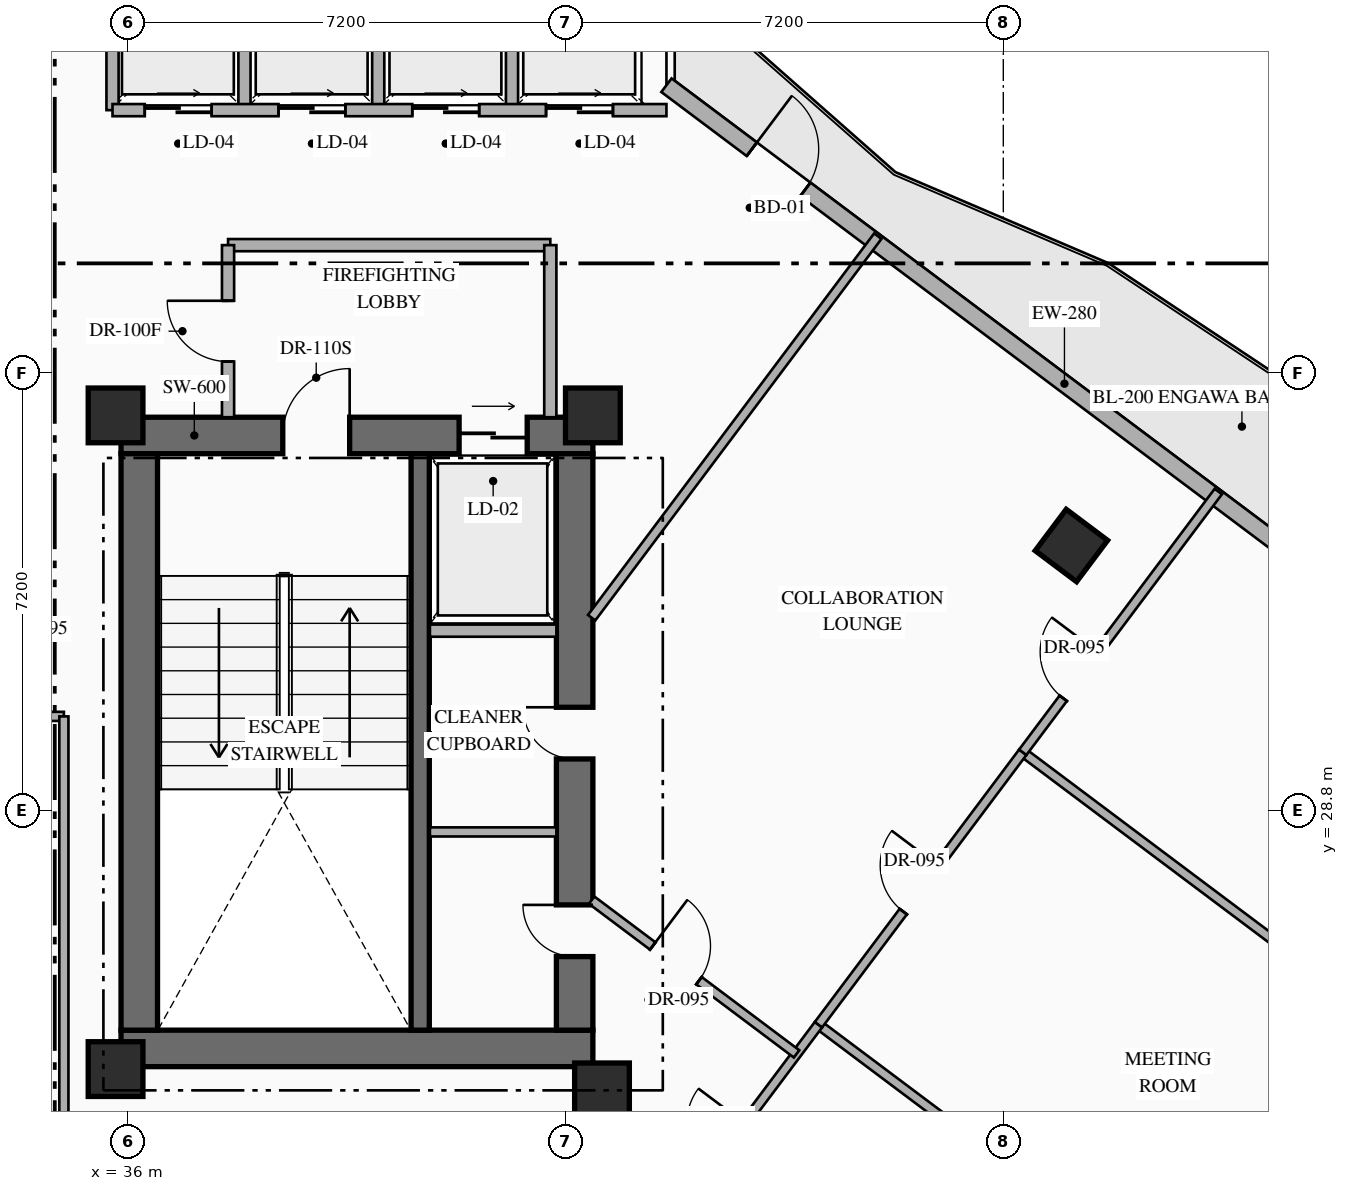
"""IFC4 building model, lengths in metres.
Left out: names, types, materials, properties, quantities, classifications, styles, units other than length and angle.
Written with IfcOpenShell. Run it as: python <this file> out.ifc"""

import sys

from ifc_helpers import new_model, si_unit, direction, frame, frame_2d, origin, origin_2d, place, context, subcontext, project, spatial, rectangle, hollow_rectangle, extrude, element, fill, save


model = new_model("IFC4")
c1 = context("Model", 3, precision=1e-05, world=origin(), true_north=direction((0.0, 1.0)))
c2 = subcontext(c1, "Body", "Model", "MODEL_VIEW")
j1 = project(units=[si_unit("LENGTHUNIT", "METRE"), si_unit("PLANEANGLEUNIT", "RADIAN")], contexts=[c1])
p1 = place(None, origin())
s1 = spatial("IfcSite", under=j1, at=p1, CompositionType="ELEMENT")
p2 = place(p1, origin())
s2 = spatial("IfcBuilding", under=s1, at=p2, CompositionType="ELEMENT")
p3 = place(p2, frame((0.0, 0.0, 145.65)))
s3 = spatial("IfcBuildingStorey", under=s2, at=p3, CompositionType="ELEMENT", Elevation=145.65)
p4 = place(p3, frame((35.89, 24.89, 0.0), z_axis=(0.0, 0.0, 1.0), x_axis=(1.0, 0.0, 0.0)))
e1 = element("IfcWall", 1, at=p4, inside=s3, PredefinedType="SHEAR", context=c2, shape_type="SweptSolid", body=[
    extrude(rectangle(XDim=7.76, YDim=0.6, at=frame_2d((3.88, 0.0))), origin(), (0.0, 0.0, 1.0), 3.6),
])
p5 = place(p3, frame((35.89, 34.97, 0.0), z_axis=(0.0, 0.0, 1.0), x_axis=(1.0, 0.0, 0.0)))
e2 = element("IfcWall", 2, at=p5, inside=s3, PredefinedType="SHEAR", context=c2, shape_type="SweptSolid", body=[
    extrude(rectangle(XDim=7.76, YDim=0.6, at=frame_2d((3.88, 0.0))), origin(), (0.0, 0.0, 1.0), 3.6),
])
p6 = place(p5, frame((2.66, 0.0, 0.0)))
e3 = element("IfcOpeningElement", 3, at=p6, cuts=e2, PredefinedType="OPENING", context=c2, shape_type="SweptSolid", body=[
    extrude(rectangle(XDim=1.1, YDim=2.2, at=frame_2d((0.55, 1.1))), frame((0.0, 0.31, 0.0), z_axis=(0.0, -1.0, 0.0), x_axis=(1.0, 0.0, 0.0)), (0.0, 0.0, 1.0), 0.62),
])
p7 = place(p5, frame((5.56, 0.0, 0.0)))
e4 = element("IfcOpeningElement", 4, at=p7, cuts=e2, PredefinedType="OPENING", context=c2, shape_type="SweptSolid", body=[
    extrude(rectangle(XDim=1.12, YDim=2.15, at=frame_2d((0.56, 1.075))), frame((0.0, 0.31, 0.0), z_axis=(0.0, -1.0, 0.0), x_axis=(1.0, 0.0, 0.0)), (0.0, 0.0, 1.0), 0.62),
])
p8 = place(p3, frame((36.19, 25.19, 0.0), z_axis=(0.0, 0.0, 1.0), x_axis=(0.0, 1.0, 0.0)))
e5 = element("IfcWall", 5, at=p8, inside=s3, PredefinedType="SHEAR", context=c2, shape_type="SweptSolid", body=[
    extrude(rectangle(XDim=9.48, YDim=0.6, at=frame_2d((4.74, 0.0))), origin(), (0.0, 0.0, 1.0), 3.6),
])
p9 = place(p3, frame((43.35, 25.19, 0.0), z_axis=(0.0, 0.0, 1.0), x_axis=(0.0, 1.0, 0.0)))
e6 = element("IfcWall", 6, at=p9, inside=s3, PredefinedType="SHEAR", context=c2, shape_type="SweptSolid", body=[
    extrude(rectangle(XDim=9.48, YDim=0.6, at=frame_2d((4.74, 0.0))), origin(), (0.0, 0.0, 1.0), 3.6),
])
p10 = place(p9, frame((1.21, 0.0, 0.0)))
e7 = element("IfcOpeningElement", 7, at=p10, cuts=e6, PredefinedType="OPENING", context=c2, shape_type="SweptSolid", body=[
    extrude(rectangle(XDim=0.85, YDim=2.08, at=frame_2d((0.425, 1.04))), frame((0.0, 0.31, 0.0), z_axis=(0.0, -1.0, 0.0), x_axis=(1.0, 0.0, 0.0)), (0.0, 0.0, 1.0), 0.62),
])
p11 = place(p9, frame((4.46, 0.0, 0.0)))
e8 = element("IfcOpeningElement", 8, at=p11, cuts=e6, PredefinedType="OPENING", context=c2, shape_type="SweptSolid", body=[
    extrude(rectangle(XDim=0.85, YDim=2.08, at=frame_2d((0.425, 1.04))), frame((0.0, 0.31, 0.0), z_axis=(0.0, -1.0, 0.0), x_axis=(1.0, 0.0, 0.0)), (0.0, 0.0, 1.0), 0.62),
])
p12 = place(p3, frame((40.81, 25.19, 0.0), z_axis=(0.0, 0.0, 1.0), x_axis=(0.0, 1.0, 0.0)))
e9 = element("IfcWall", 9, at=p12, inside=s3, PredefinedType="SHEAR", context=c2, shape_type="SweptSolid", body=[
    extrude(rectangle(XDim=9.48, YDim=0.3, at=frame_2d((4.74, 0.0))), origin(), (0.0, 0.0, 1.0), 3.6),
])
for number, where, z_axis, x_axis in (
    (10, (35.8, 24.55, 0.0), (0.0, 0.0, 1.0), (1.0, 0.0, 0.0)),
    (11, (43.8, 24.2, 0.0), (0.0, 0.0, 1.0), (1.0, 0.0, 0.0)),
    (12, (35.8, 35.3, 0.0), (0.0, 0.0, 1.0), (1.0, 0.0, 0.0)),
    (13, (43.65, 35.3, 0.0), (0.0, 0.0, 1.0), (1.0, 0.0, 0.0)),
):
    element("IfcColumn", number, at=place(p3, frame(where, z_axis=z_axis, x_axis=x_axis)), inside=s3, PredefinedType="COLUMN", context=c2, shape_type="SweptSolid", body=[
        extrude(rectangle(XDim=0.9, YDim=0.9, at=origin_2d()), origin(), (0.0, 0.0, 1.0), 3.6),
    ])
p13 = place(p3, frame((51.52, 33.16, 0.0), z_axis=(0.0, 0.0, 1.0), x_axis=(0.799999996291, -0.600000004945, 0.0)))
e14 = element("IfcColumn", 14, at=p13, inside=s3, PredefinedType="COLUMN", context=c2, shape_type="SweptSolid", body=[
    extrude(hollow_rectangle(XDim=0.85, YDim=0.85, WallThickness=0.032, at=origin_2d()), origin(), (0.0, 0.0, 1.0), 3.6),
])
p14 = place(p3, frame((44.86, 40.73, 0.0), z_axis=(0.0, 0.0, 1.0), x_axis=(0.800007624502, -0.599989833863, 0.0)))
e15 = element("IfcWall", 15, at=p14, inside=s3, PredefinedType="STANDARD", context=c2, shape_type="SweptSolid", body=[
    extrude(rectangle(XDim=19.212, YDim=0.28, at=frame_2d((9.606, 0.0))), origin(), (0.0, 0.0, 1.0), 3.35),
])
p15 = place(p14, frame((1.755, 0.0, 0.0)))
e16 = element("IfcOpeningElement", 16, at=p15, cuts=e15, PredefinedType="OPENING", context=c2, shape_type="SweptSolid", body=[
    extrude(rectangle(XDim=1.1, YDim=2.2, at=frame_2d((0.55, 1.1))), frame((0.0, 0.15, 0.0), z_axis=(0.0, -1.0, 0.0), x_axis=(1.0, 0.0, 0.0)), (0.0, 0.0, 1.0), 0.3),
])
p16 = place(p14, frame((13.509, 0.0, 0.85)))
e17 = element("IfcOpeningElement", 17, at=p16, cuts=e15, PredefinedType="OPENING", context=c2, shape_type="SweptSolid", body=[
    extrude(rectangle(XDim=1.8, YDim=2.1, at=frame_2d((0.9, 1.05))), frame((0.0, 0.15, 0.0), z_axis=(0.0, -1.0, 0.0), x_axis=(1.0, 0.0, 0.0)), (0.0, 0.0, 1.0), 0.3),
])
p17 = place(p3, frame((40.97, 31.76, 0.0), z_axis=(0.0, 0.0, 1.0), x_axis=(1.0, 0.0, 0.0)))
e18 = element("IfcWall", 18, at=p17, inside=s3, PredefinedType="STANDARD", context=c2, shape_type="SweptSolid", body=[
    extrude(rectangle(XDim=2.08, YDim=0.2, at=frame_2d((1.04, 0.0))), origin(), (0.0, 0.0, 1.0), 3.35),
])
p18 = place(p3, frame((40.97, 28.45, 0.0), z_axis=(0.0, 0.0, 1.0), x_axis=(1.0, 0.0, 0.0)))
e19 = element("IfcWall", 19, at=p18, inside=s3, PredefinedType="PARTITIONING", context=c2, shape_type="SweptSolid", body=[
    extrude(rectangle(XDim=2.08, YDim=0.15, at=frame_2d((1.04, 0.0))), origin(), (0.0, 0.0, 1.0), 3.35),
])
p19 = place(p3, frame((37.65, 38.1, 0.0), z_axis=(0.0, 0.0, 1.0), x_axis=(1.0, 0.0, 0.0)))
e20 = element("IfcWall", 20, at=p19, inside=s3, PredefinedType="STANDARD", context=c2, shape_type="SweptSolid", body=[
    extrude(rectangle(XDim=5.3, YDim=0.2, at=frame_2d((2.65, 0.0))), origin(), (0.0, 0.0, 1.0), 3.35),
])
p20 = place(p3, frame((42.95, 35.27, 0.0), z_axis=(0.0, 0.0, 1.0), x_axis=(0.0, 1.0, 0.0)))
e21 = element("IfcWall", 21, at=p20, inside=s3, PredefinedType="STANDARD", context=c2, shape_type="SweptSolid", body=[
    extrude(rectangle(XDim=2.83, YDim=0.2, at=frame_2d((1.415, 0.0))), origin(), (0.0, 0.0, 1.0), 3.35),
])
p21 = place(p3, frame((37.65, 35.27, 0.0), z_axis=(0.0, 0.0, 1.0), x_axis=(0.0, 1.0, 0.0)))
e22 = element("IfcWall", 22, at=p21, inside=s3, PredefinedType="STANDARD", context=c2, shape_type="SweptSolid", body=[
    extrude(rectangle(XDim=2.83, YDim=0.2, at=frame_2d((1.415, 0.0))), origin(), (0.0, 0.0, 1.0), 3.35),
])
p22 = place(p21, frame((0.915, 0.0, 0.0)))
e23 = element("IfcOpeningElement", 23, at=p22, cuts=e22, PredefinedType="OPENING", context=c2, shape_type="SweptSolid", body=[
    extrude(rectangle(XDim=1.0, YDim=2.2, at=frame_2d((0.5, 1.1))), frame((0.0, 0.11, 0.0), z_axis=(0.0, -1.0, 0.0), x_axis=(1.0, 0.0, 0.0)), (0.0, 0.0, 1.0), 0.22),
])
for number, where, z_axis, x_axis in (
    (24, (35.75, 40.32, 0.0), (0.0, 0.0, 1.0), (0.0, 1.0, 0.0)),
    (25, (37.92, 40.32, 0.0), (0.0, 0.0, 1.0), (0.0, 1.0, 0.0)),
    (26, (40.12, 40.32, 0.0), (0.0, 0.0, 1.0), (0.0, 1.0, 0.0)),
    (27, (42.32, 40.32, 0.0), (0.0, 0.0, 1.0), (0.0, 1.0, 0.0)),
):
    element("IfcWall", number, at=place(p3, frame(where, z_axis=z_axis, x_axis=x_axis)), inside=s3, PredefinedType="STANDARD", context=c2, shape_type="SweptSolid", body=[
        extrude(rectangle(XDim=2.16, YDim=0.2, at=frame_2d((1.08, 0.0))), origin(), (0.0, 0.0, 1.0), 3.35),
    ])
p23 = place(p3, frame((35.75, 40.32, 0.0), z_axis=(0.0, 0.0, 1.0), x_axis=(1.0, 0.0, 0.0)))
e28 = element("IfcWall", 28, at=p23, inside=s3, PredefinedType="STANDARD", context=c2, shape_type="SweptSolid", body=[
    extrude(rectangle(XDim=9.11, YDim=0.2, at=frame_2d((4.555, 0.0))), origin(), (0.0, 0.0, 1.0), 3.35),
])
p24 = place(p23, frame((0.53, 0.0, 0.0)))
e29 = element("IfcOpeningElement", 29, at=p24, cuts=e28, PredefinedType="OPENING", context=c2, shape_type="SweptSolid", body=[
    extrude(rectangle(XDim=1.1, YDim=2.18, at=frame_2d((0.55, 1.09))), frame((0.0, 0.11, 0.0), z_axis=(0.0, -1.0, 0.0), x_axis=(1.0, 0.0, 0.0)), (0.0, 0.0, 1.0), 0.22),
])
p25 = place(p23, frame((2.73, 0.0, 0.0)))
e30 = element("IfcOpeningElement", 30, at=p25, cuts=e28, PredefinedType="OPENING", context=c2, shape_type="SweptSolid", body=[
    extrude(rectangle(XDim=1.1, YDim=2.18, at=frame_2d((0.55, 1.09))), frame((0.0, 0.11, 0.0), z_axis=(0.0, -1.0, 0.0), x_axis=(1.0, 0.0, 0.0)), (0.0, 0.0, 1.0), 0.22),
])
p26 = place(p23, frame((4.93, 0.0, 0.0)))
e31 = element("IfcOpeningElement", 31, at=p26, cuts=e28, PredefinedType="OPENING", context=c2, shape_type="SweptSolid", body=[
    extrude(rectangle(XDim=1.1, YDim=2.18, at=frame_2d((0.55, 1.09))), frame((0.0, 0.11, 0.0), z_axis=(0.0, -1.0, 0.0), x_axis=(1.0, 0.0, 0.0)), (0.0, 0.0, 1.0), 0.22),
])
p27 = place(p23, frame((7.13, 0.0, 0.0)))
e32 = element("IfcOpeningElement", 32, at=p27, cuts=e28, PredefinedType="OPENING", context=c2, shape_type="SweptSolid", body=[
    extrude(rectangle(XDim=1.1, YDim=2.18, at=frame_2d((0.55, 1.09))), frame((0.0, 0.11, 0.0), z_axis=(0.0, -1.0, 0.0), x_axis=(1.0, 0.0, 0.0)), (0.0, 0.0, 1.0), 0.22),
])
p28 = place(p3, frame((30.5, 30.35, 0.0), z_axis=(0.0, 0.0, 1.0), x_axis=(1.0, 0.0, 0.0)))
e33 = element("IfcWall", 33, at=p28, inside=s3, PredefinedType="PARTITIONING", context=c2, shape_type="SweptSolid", body=[
    extrude(rectangle(XDim=4.45, YDim=0.15, at=frame_2d((2.225, 0.0))), origin(), (0.0, 0.0, 1.0), 3.35),
])
p29 = place(p28, frame((2.846, 0.0, 0.0)))
e34 = element("IfcOpeningElement", 34, at=p29, cuts=e33, PredefinedType="OPENING", context=c2, shape_type="SweptSolid", body=[
    extrude(rectangle(XDim=0.95, YDim=2.15, at=frame_2d((0.475, 1.075))), frame((0.0, 0.085, 0.0), z_axis=(0.0, -1.0, 0.0), x_axis=(1.0, 0.0, 0.0)), (0.0, 0.0, 1.0), 0.17),
])
p30 = place(p3, frame((34.95, 23.2, 0.0), z_axis=(0.0, 0.0, 1.0), x_axis=(0.0, 1.0, 0.0)))
e35 = element("IfcWall", 35, at=p30, inside=s3, PredefinedType="PARTITIONING", context=c2, shape_type="SweptSolid", body=[
    extrude(rectangle(XDim=7.15, YDim=0.15, at=frame_2d((3.575, 0.0))), origin(), (0.0, 0.0, 1.0), 3.35),
])
p31 = place(p3, frame((47.36, 25.28, 0.0), z_axis=(0.0, 0.0, 1.0), x_axis=(0.799991516197, -0.600011311571, 0.0)))
e36 = element("IfcWall", 36, at=p31, inside=s3, PredefinedType="PARTITIONING", context=c2, shape_type="SweptSolid", body=[
    extrude(rectangle(XDim=10.36, YDim=0.15, at=frame_2d((5.18, 0.0))), origin(), (0.0, 0.0, 1.0), 3.35),
])
p32 = place(p3, frame((44.36, 21.28, 0.0), z_axis=(0.0, 0.0, 1.0), x_axis=(0.6, 0.8, 0.0)))
e37 = element("IfcWall", 37, at=p32, inside=s3, PredefinedType="PARTITIONING", context=c2, shape_type="SweptSolid", body=[
    extrude(rectangle(XDim=5.0, YDim=0.15, at=frame_2d((2.5, 0.0))), origin(), (0.0, 0.0, 1.0), 3.35),
])
p33 = place(p32, frame((2.025, 0.0, 0.0)))
e38 = element("IfcOpeningElement", 38, at=p33, cuts=e37, PredefinedType="OPENING", context=c2, shape_type="SweptSolid", body=[
    extrude(rectangle(XDim=0.95, YDim=2.15, at=frame_2d((0.475, 1.075))), frame((0.0, 0.085, 0.0), z_axis=(0.0, -1.0, 0.0), x_axis=(1.0, 0.0, 0.0)), (0.0, 0.0, 1.0), 0.17),
])
p34 = place(p3, frame((50.72, 29.76, 0.0), z_axis=(0.0, 0.0, 1.0), x_axis=(0.8, -0.6, 0.0)))
e39 = element("IfcWall", 39, at=p34, inside=s3, PredefinedType="PARTITIONING", context=c2, shape_type="SweptSolid", body=[
    extrude(rectangle(XDim=10.36, YDim=0.15, at=frame_2d((5.18, 0.0))), origin(), (0.0, 0.0, 1.0), 3.35),
])
p35 = place(p3, frame((47.36, 25.28, 0.0), z_axis=(0.0, 0.0, 1.0), x_axis=(0.599986048773, 0.80001046323, 0.0)))
e40 = element("IfcWall", 40, at=p35, inside=s3, PredefinedType="PARTITIONING", context=c2, shape_type="SweptSolid", body=[
    extrude(rectangle(XDim=5.6, YDim=0.15, at=frame_2d((2.8, 0.0))), origin(), (0.0, 0.0, 1.0), 3.35),
])
p36 = place(p35, frame((2.325, 0.0, 0.0)))
e41 = element("IfcOpeningElement", 41, at=p36, cuts=e40, PredefinedType="OPENING", context=c2, shape_type="SweptSolid", body=[
    extrude(rectangle(XDim=0.95, YDim=2.15, at=frame_2d((0.475, 1.075))), frame((0.0, 0.085, 0.0), z_axis=(0.0, -1.0, 0.0), x_axis=(1.0, 0.0, 0.0)), (0.0, 0.0, 1.0), 0.17),
])
p37 = place(p3, frame((50.72, 29.76, 0.0), z_axis=(0.0, 0.0, 1.0), x_axis=(0.6, 0.8, 0.0)))
e42 = element("IfcWall", 42, at=p37, inside=s3, PredefinedType="PARTITIONING", context=c2, shape_type="SweptSolid", body=[
    extrude(rectangle(XDim=5.36, YDim=0.15, at=frame_2d((2.68, 0.0))), origin(), (0.0, 0.0, 1.0), 3.35),
])
p38 = place(p37, frame((1.11, 0.0, 0.0)))
e43 = element("IfcOpeningElement", 43, at=p38, cuts=e42, PredefinedType="OPENING", context=c2, shape_type="SweptSolid", body=[
    extrude(rectangle(XDim=0.95, YDim=2.15, at=frame_2d((0.475, 1.075))), frame((0.0, 0.085, 0.0), z_axis=(0.0, -1.0, 0.0), x_axis=(1.0, 0.0, 0.0)), (0.0, 0.0, 1.0), 0.17),
])
p39 = place(p3, frame((43.63, 27.328, 0.0), z_axis=(0.0, 0.0, 1.0), x_axis=(0.799972182084, -0.600037088764, 0.0)))
e44 = element("IfcWall", 44, at=p39, inside=s3, PredefinedType="PARTITIONING", context=c2, shape_type="SweptSolid", body=[
    extrude(rectangle(XDim=4.213, YDim=0.15, at=frame_2d((2.106, 0.0))), origin(), (0.0, 0.0, 1.0), 3.045),
])
p40 = place(p39, frame((1.256, 0.0, 0.0)))
e45 = element("IfcOpeningElement", 45, at=p40, cuts=e44, PredefinedType="OPENING", context=c2, shape_type="SweptSolid", body=[
    extrude(rectangle(XDim=0.95, YDim=2.15, at=frame_2d((0.475, 1.075))), frame((0.0, 0.085, 0.0), z_axis=(0.0, -1.0, 0.0), x_axis=(1.0, 0.0, 0.0)), (0.0, 0.0, 1.0), 0.17),
])
p41 = place(p3, frame((43.63, 31.973, 0.0), z_axis=(0.0, 0.0, 1.0), x_axis=(0.599975099311, 0.800018674911, 0.0)))
e46 = element("IfcWall", 46, at=p41, inside=s3, PredefinedType="PARTITIONING", context=c2, shape_type="SweptSolid", body=[
    extrude(rectangle(XDim=7.844, YDim=0.15, at=frame_2d((3.922, 0.0))), origin(), (0.0, 0.0, 1.0), 3.35),
])
p42 = place(p3, frame((27.91, 26.68, 0.0), z_axis=(0.0, 0.0, 1.0), x_axis=(0.800005938517, -0.599992081896, 0.0)))
e47 = element("IfcWall", 47, at=p42, inside=s3, PredefinedType="PARTITIONING", context=c2, shape_type="SweptSolid", body=[
    extrude(rectangle(XDim=14.8, YDim=0.15, at=frame_2d((7.4, 0.0))), origin(), (0.0, 0.0, 1.0), 3.35),
])
p43 = place(p42, frame((9.281, 0.0, 0.0)))
e48 = element("IfcOpeningElement", 48, at=p43, cuts=e47, PredefinedType="OPENING", context=c2, shape_type="SweptSolid", body=[
    extrude(rectangle(XDim=0.95, YDim=2.15, at=frame_2d((0.475, 1.075))), frame((0.0, 0.085, 0.0), z_axis=(0.0, -1.0, 0.0), x_axis=(1.0, 0.0, 0.0)), (0.0, 0.0, 1.0), 0.17),
])
p44 = place(p15, origin())
e49 = element("IfcDoor", 49, at=p44, inside=s3, OperationType="SINGLE_SWING_LEFT", PredefinedType="DOOR", context=c2, shape_type="SweptSolid", body=[
    extrude(rectangle(XDim=1.1, YDim=2.2, at=frame_2d((0.55, 1.1))), frame((0.0, 0.025, 0.0), z_axis=(0.0, -1.0, 0.0), x_axis=(1.0, 0.0, 0.0)), (0.0, 0.0, 1.0), 0.05),
])
fill(e16, e49)
p45 = place(p6, origin())
e50 = element("IfcDoor", 50, at=p45, inside=s3, OperationType="SINGLE_SWING_RIGHT", PredefinedType="DOOR", context=c2, shape_type="SweptSolid", body=[
    extrude(rectangle(XDim=1.1, YDim=2.2, at=frame_2d((0.55, 1.1))), frame((0.0, 0.025, 0.0), z_axis=(0.0, -1.0, 0.0), x_axis=(1.0, 0.0, 0.0)), (0.0, 0.0, 1.0), 0.05),
])
fill(e3, e50)
p46 = place(p7, origin())
e51 = element("IfcDoor", 51, at=p46, inside=s3, OperationType="SLIDING_TO_RIGHT", PredefinedType="USERDEFINED", context=c2, shape_type="SweptSolid", body=[
    extrude(rectangle(XDim=1.12, YDim=2.15, at=frame_2d((0.56, 1.075))), frame((0.0, 0.025, 0.0), z_axis=(0.0, -1.0, 0.0), x_axis=(1.0, 0.0, 0.0)), (0.0, 0.0, 1.0), 0.05),
])
fill(e4, e51)
p47 = place(p10, origin())
e52 = element("IfcDoor", 52, at=p47, inside=s3, OperationType="SINGLE_SWING_RIGHT", PredefinedType="DOOR", context=c2, shape_type="SweptSolid", body=[
    extrude(rectangle(XDim=0.85, YDim=2.08, at=frame_2d((0.425, 1.04))), frame((0.0, 0.025, 0.0), z_axis=(0.0, -1.0, 0.0), x_axis=(1.0, 0.0, 0.0)), (0.0, 0.0, 1.0), 0.05),
])
fill(e7, e52)
p48 = place(p11, origin())
e53 = element("IfcDoor", 53, at=p48, inside=s3, OperationType="SINGLE_SWING_RIGHT", PredefinedType="DOOR", context=c2, shape_type="SweptSolid", body=[
    extrude(rectangle(XDim=0.85, YDim=2.08, at=frame_2d((0.425, 1.04))), frame((0.0, 0.025, 0.0), z_axis=(0.0, -1.0, 0.0), x_axis=(1.0, 0.0, 0.0)), (0.0, 0.0, 1.0), 0.05),
])
fill(e8, e53)
p49 = place(p22, origin())
e54 = element("IfcDoor", 54, at=p49, inside=s3, OperationType="SINGLE_SWING_RIGHT", PredefinedType="DOOR", context=c2, shape_type="SweptSolid", body=[
    extrude(rectangle(XDim=1.0, YDim=2.2, at=frame_2d((0.5, 1.1))), frame((0.0, 0.025, 0.0), z_axis=(0.0, -1.0, 0.0), x_axis=(1.0, 0.0, 0.0)), (0.0, 0.0, 1.0), 0.05),
])
fill(e23, e54)
p50 = place(p24, origin())
e55 = element("IfcDoor", 55, at=p50, inside=s3, OperationType="SLIDING_TO_RIGHT", PredefinedType="USERDEFINED", context=c2, shape_type="SweptSolid", body=[
    extrude(rectangle(XDim=1.1, YDim=2.18, at=frame_2d((0.55, 1.09))), frame((0.0, 0.025, 0.0), z_axis=(0.0, -1.0, 0.0), x_axis=(1.0, 0.0, 0.0)), (0.0, 0.0, 1.0), 0.05),
])
fill(e29, e55)
p51 = place(p25, origin())
e56 = element("IfcDoor", 56, at=p51, inside=s3, OperationType="SLIDING_TO_RIGHT", PredefinedType="USERDEFINED", context=c2, shape_type="SweptSolid", body=[
    extrude(rectangle(XDim=1.1, YDim=2.18, at=frame_2d((0.55, 1.09))), frame((0.0, 0.025, 0.0), z_axis=(0.0, -1.0, 0.0), x_axis=(1.0, 0.0, 0.0)), (0.0, 0.0, 1.0), 0.05),
])
fill(e30, e56)
p52 = place(p26, origin())
e57 = element("IfcDoor", 57, at=p52, inside=s3, OperationType="SLIDING_TO_RIGHT", PredefinedType="USERDEFINED", context=c2, shape_type="SweptSolid", body=[
    extrude(rectangle(XDim=1.1, YDim=2.18, at=frame_2d((0.55, 1.09))), frame((0.0, 0.025, 0.0), z_axis=(0.0, -1.0, 0.0), x_axis=(1.0, 0.0, 0.0)), (0.0, 0.0, 1.0), 0.05),
])
fill(e31, e57)
p53 = place(p27, origin())
e58 = element("IfcDoor", 58, at=p53, inside=s3, OperationType="SLIDING_TO_RIGHT", PredefinedType="USERDEFINED", context=c2, shape_type="SweptSolid", body=[
    extrude(rectangle(XDim=1.1, YDim=2.18, at=frame_2d((0.55, 1.09))), frame((0.0, 0.025, 0.0), z_axis=(0.0, -1.0, 0.0), x_axis=(1.0, 0.0, 0.0)), (0.0, 0.0, 1.0), 0.05),
])
fill(e32, e58)
p54 = place(p36, origin())
e59 = element("IfcDoor", 59, at=p54, inside=s3, OperationType="SINGLE_SWING_RIGHT", PredefinedType="DOOR", context=c2, shape_type="SweptSolid", body=[
    extrude(rectangle(XDim=0.95, YDim=2.15, at=frame_2d((0.475, 1.075))), frame((0.0, 0.025, 0.0), z_axis=(0.0, -1.0, 0.0), x_axis=(1.0, 0.0, 0.0)), (0.0, 0.0, 1.0), 0.05),
])
fill(e41, e59)
p55 = place(p38, origin())
e60 = element("IfcDoor", 60, at=p55, inside=s3, OperationType="SINGLE_SWING_RIGHT", PredefinedType="DOOR", context=c2, shape_type="SweptSolid", body=[
    extrude(rectangle(XDim=0.95, YDim=2.15, at=frame_2d((0.475, 1.075))), frame((0.0, 0.025, 0.0), z_axis=(0.0, -1.0, 0.0), x_axis=(1.0, 0.0, 0.0)), (0.0, 0.0, 1.0), 0.05),
])
fill(e43, e60)
p56 = place(p40, origin())
e61 = element("IfcDoor", 61, at=p56, inside=s3, OperationType="SINGLE_SWING_LEFT", PredefinedType="DOOR", context=c2, shape_type="SweptSolid", body=[
    extrude(rectangle(XDim=0.95, YDim=2.15, at=frame_2d((0.475, 1.075))), frame((0.0, 0.025, 0.0), z_axis=(0.0, -1.0, 0.0), x_axis=(1.0, 0.0, 0.0)), (0.0, 0.0, 1.0), 0.05),
])
fill(e45, e61)
save(model, sys.argv[1])
